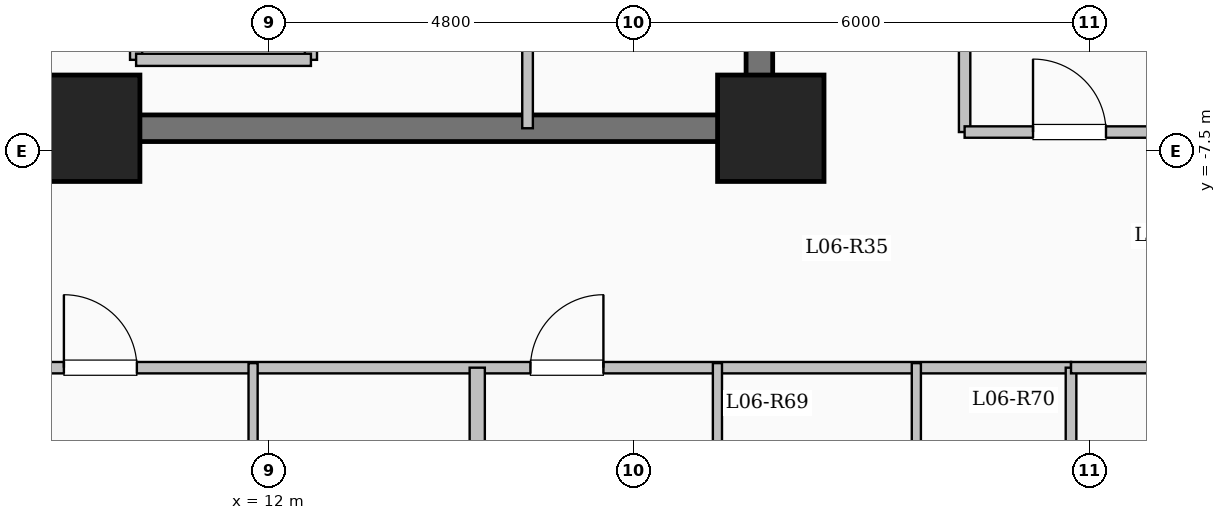
"""IFC4 building model, lengths in metres.
Left out: names, types, materials, properties, quantities, classifications, styles, units other than length and angle.
Written with IfcOpenShell. Run it as: python <this file> out.ifc"""

import sys

from ifc_helpers import new_model, si_unit, direction, frame, frame_2d, origin, origin_2d, place, context, subcontext, project, spatial, rectangle, extrude, element, fill, save


model = new_model("IFC4")
c1 = context("Model", 3, precision=1e-05, world=origin(), true_north=direction((0.0, 1.0)))
c2 = subcontext(c1, "Body", "Model", "MODEL_VIEW")
j1 = project(units=[si_unit("LENGTHUNIT", "METRE"), si_unit("PLANEANGLEUNIT", "RADIAN")], contexts=[c1])
p1 = place(None, origin())
s1 = spatial("IfcSite", under=j1, at=p1, CompositionType="ELEMENT")
p2 = place(p1, origin())
s2 = spatial("IfcBuilding", under=s1, at=p2, CompositionType="ELEMENT")
p3 = place(p2, frame((0.0, 0.0, 27.35)))
s3 = spatial("IfcBuildingStorey", under=s2, at=p3, CompositionType="ELEMENT", Elevation=27.35)
for number, where, z_axis, x_axis in (
    (1, (9.6, -7.2, 0.0), (0.0, 0.0, 1.0), (1.0, 0.0, 0.0)),
    (2, (18.6, -7.2, 0.0), (0.0, 0.0, 1.0), (1.0, 0.0, 0.0)),
):
    element("IfcColumn", number, at=place(p3, frame(where, z_axis=z_axis, x_axis=x_axis)), inside=s3, PredefinedType="COLUMN", context=c2, shape_type="SweptSolid", body=[
        extrude(rectangle(XDim=1.4, YDim=1.4, at=origin_2d()), origin(), (0.0, 0.0, 1.0), 3.35),
    ])
for number, where, z_axis, x_axis in (
    (3, (10.25, -6.3, 0.0), (0.0, 0.0, 1.0), (0.0, 1.0, 0.0)),
    (4, (12.55, -6.3, 0.0), (0.0, 0.0, 1.0), (0.0, 1.0, 0.0)),
):
    element("IfcWall", number, at=place(p3, frame(where, z_axis=z_axis, x_axis=x_axis)), inside=s3, PredefinedType="SOLIDWALL", context=c2, shape_type="SweptSolid", body=[
        extrude(rectangle(XDim=2.6, YDim=0.16, at=frame_2d((1.3, 0.0))), origin(), (0.0, 0.0, 1.0), 3.1),
    ])
p4 = place(p3, frame((10.25, -6.3, 0.0), z_axis=(0.0, 0.0, 1.0), x_axis=(1.0, 0.0, 0.0)))
e5 = element("IfcWall", 5, at=p4, inside=s3, PredefinedType="SOLIDWALL", context=c2, shape_type="SweptSolid", body=[
    extrude(rectangle(XDim=2.3, YDim=0.16, at=frame_2d((1.15, 0.0))), origin(), (0.0, 0.0, 1.0), 3.1),
])
p5 = place(p3, frame((18.45, -7.375, 0.0), z_axis=(0.0, 0.0, 1.0), x_axis=(0.0, 1.0, 0.0)))
e6 = element("IfcWall", 6, at=p5, inside=s3, PredefinedType="SHEAR", context=c2, shape_type="SweptSolid", body=[
    extrude(rectangle(XDim=14.05, YDim=0.35, at=frame_2d((7.025, 0.0))), origin(), (0.0, 0.0, 1.0), 3.35),
])
p6 = place(p3, frame((10.075, -7.2, 0.0), z_axis=(0.0, 0.0, 1.0), x_axis=(1.0, 0.0, 0.0)))
e7 = element("IfcWall", 7, at=p6, inside=s3, PredefinedType="SHEAR", context=c2, shape_type="SweptSolid", body=[
    extrude(rectangle(XDim=8.55, YDim=0.35, at=frame_2d((4.275, 0.0))), origin(), (0.0, 0.0, 1.0), 3.35),
])
p7 = place(p3, frame((15.4, -7.2, 0.0), z_axis=(0.0, 0.0, 1.0), x_axis=(0.0, 1.0, 0.0)))
e8 = element("IfcWall", 8, at=p7, inside=s3, PredefinedType="PARTITIONING", context=c2, shape_type="SweptSolid", body=[
    extrude(rectangle(XDim=10.45, YDim=0.14, at=frame_2d((5.225, 0.0))), origin(), (0.0, 0.0, 1.0), 3.1),
])
p8 = place(p7, frame((9.25, 0.0, 0.0)))
e9 = element("IfcOpeningElement", 9, at=p8, cuts=e8, PredefinedType="OPENING", context=c2, shape_type="SweptSolid", body=[
    extrude(rectangle(XDim=0.9, YDim=2.08, at=frame_2d((0.45, 1.04))), frame((0.0, 0.08, 0.0), z_axis=(0.0, -1.0, 0.0), x_axis=(1.0, 0.0, 0.0)), (0.0, 0.0, 1.0), 0.16),
])
p9 = place(p3, frame((21.15, -7.25, 0.0), z_axis=(0.0, 0.0, 1.0), x_axis=(0.0, 1.0, 0.0)))
e10 = element("IfcWall", 10, at=p9, inside=s3, PredefinedType="PARTITIONING", context=c2, shape_type="SweptSolid", body=[
    extrude(rectangle(XDim=18.0, YDim=0.15, at=frame_2d((9.0, 0.0))), origin(), (0.0, 0.0, 1.0), 2.585),
])
p10 = place(p3, frame((8.55, -10.35, 0.0), z_axis=(0.0, 0.0, 1.0), x_axis=(1.0, 0.0, 0.0)))
e11 = element("IfcWall", 11, at=p10, inside=s3, PredefinedType="PARTITIONING", context=c2, shape_type="SweptSolid", body=[
    extrude(rectangle(XDim=14.0, YDim=0.15, at=frame_2d((7.0, 0.0))), origin(), (0.0, 0.0, 1.0), 3.1),
])
p11 = place(p10, frame((0.75, 0.0, 0.0)))
e12 = element("IfcOpeningElement", 12, at=p11, cuts=e11, PredefinedType="OPENING", context=c2, shape_type="SweptSolid", body=[
    extrude(rectangle(XDim=0.96, YDim=2.15, at=frame_2d((0.48, 1.075))), frame((0.0, 0.085, 0.0), z_axis=(0.0, -1.0, 0.0), x_axis=(1.0, 0.0, 0.0)), (0.0, 0.0, 1.0), 0.17),
])
p12 = place(p10, frame((6.888, 0.0, 0.0)))
e13 = element("IfcOpeningElement", 13, at=p12, cuts=e11, PredefinedType="OPENING", context=c2, shape_type="SweptSolid", body=[
    extrude(rectangle(XDim=0.96, YDim=2.15, at=frame_2d((0.48, 1.075))), frame((0.0, 0.085, 0.0), z_axis=(0.0, -1.0, 0.0), x_axis=(1.0, 0.0, 0.0)), (0.0, 0.0, 1.0), 0.17),
])
p13 = place(p3, frame((14.738, -23.6, 0.0), z_axis=(0.0, 0.0, 1.0), x_axis=(0.0, 1.0, 0.0)))
e14 = element("IfcWall", 14, at=p13, inside=s3, PredefinedType="SOLIDWALL", context=c2, shape_type="SweptSolid", body=[
    extrude(rectangle(XDim=13.25, YDim=0.2, at=frame_2d((6.625, 0.0))), origin(), (0.0, 0.0, 1.0), 2.435),
])
p14 = place(p3, frame((11.789, -13.51, 0.0), z_axis=(0.0, 0.0, 1.0), x_axis=(0.0, 1.0, 0.0)))
e15 = element("IfcWall", 15, at=p14, inside=s3, PredefinedType="PARTITIONING", context=c2, shape_type="SweptSolid", body=[
    extrude(rectangle(XDim=3.22, YDim=0.12, at=frame_2d((1.61, 0.0))), origin(), (0.0, 0.0, 1.0), 3.1),
])
p15 = place(p14, frame((1.14, 0.0, 0.0)))
e16 = element("IfcOpeningElement", 16, at=p15, cuts=e15, PredefinedType="OPENING", context=c2, shape_type="SweptSolid", body=[
    extrude(rectangle(XDim=0.88, YDim=2.1, at=frame_2d((0.44, 1.05))), frame((0.0, 0.07, 0.0), z_axis=(0.0, -1.0, 0.0), x_axis=(1.0, 0.0, 0.0)), (0.0, 0.0, 1.0), 0.14),
])
p16 = place(p3, frame((17.898, -23.6, 0.0), z_axis=(0.0, 0.0, 1.0), x_axis=(0.0, 1.0, 0.0)))
e17 = element("IfcWall", 17, at=p16, inside=s3, PredefinedType="PARTITIONING", context=c2, shape_type="SweptSolid", body=[
    extrude(rectangle(XDim=13.31, YDim=0.12, at=frame_2d((6.655, 0.0))), origin(), (0.0, 0.0, 1.0), 3.1),
])
p17 = place(p16, frame((9.485, 0.0, 0.0)))
e18 = element("IfcOpeningElement", 18, at=p17, cuts=e17, PredefinedType="OPENING", context=c2, shape_type="SweptSolid", body=[
    extrude(rectangle(XDim=1.08, YDim=2.15, at=frame_2d((0.54, 1.075))), frame((0.0, 0.07, 0.0), z_axis=(0.0, -1.0, 0.0), x_axis=(1.0, 0.0, 0.0)), (0.0, 0.0, 1.0), 0.14),
])
p18 = place(p3, frame((20.515, -12.75, 0.0), z_axis=(0.0, 0.0, 1.0), x_axis=(0.0, 1.0, 0.0)))
e19 = element("IfcWall", 19, at=p18, inside=s3, PredefinedType="PARTITIONING", context=c2, shape_type="SweptSolid", body=[
    extrude(rectangle(XDim=2.46, YDim=0.12, at=frame_2d((1.23, 0.0))), origin(), (0.0, 0.0, 1.0), 3.1),
])
p19 = place(p3, frame((21.15, -7.25, 0.0), z_axis=(0.0, 0.0, 1.0), x_axis=(1.0, 0.0, 0.0)))
e20 = element("IfcWall", 20, at=p19, inside=s3, PredefinedType="PARTITIONING", context=c2, shape_type="SweptSolid", body=[
    extrude(rectangle(XDim=7.53, YDim=0.15, at=frame_2d((3.765, 0.0))), origin(), (0.0, 0.0, 1.0), 3.1),
])
p20 = place(p19, frame((0.9, 0.0, 0.0)))
e21 = element("IfcOpeningElement", 21, at=p20, cuts=e20, PredefinedType="OPENING", context=c2, shape_type="SweptSolid", body=[
    extrude(rectangle(XDim=0.96, YDim=2.15, at=frame_2d((0.48, 1.075))), frame((0.0, 0.085, 0.0), z_axis=(0.0, -1.0, 0.0), x_axis=(1.0, 0.0, 0.0)), (0.0, 0.0, 1.0), 0.17),
])
p21 = place(p3, frame((22.55, -19.05, 0.0), z_axis=(0.0, 0.0, 1.0), x_axis=(0.0, 1.0, 0.0)))
e22 = element("IfcWall", 22, at=p21, inside=s3, PredefinedType="PARTITIONING", context=c2, shape_type="SweptSolid", body=[
    extrude(rectangle(XDim=8.7, YDim=0.14, at=frame_2d((4.35, 0.0))), origin(), (0.0, 0.0, 1.0), 3.1),
])
p22 = place(p3, frame((22.55, -10.35, 0.0), z_axis=(0.0, 0.0, 1.0), x_axis=(1.0, 0.0, 0.0)))
e23 = element("IfcWall", 23, at=p22, inside=s3, PredefinedType="PARTITIONING", context=c2, shape_type="SweptSolid", body=[
    extrude(rectangle(XDim=6.13, YDim=0.15, at=frame_2d((3.065, 0.0))), origin(), (0.0, 0.0, 1.0), 3.1),
])
p23 = place(p22, frame((2.59, 0.0, 0.0)))
e24 = element("IfcOpeningElement", 24, at=p23, cuts=e23, PredefinedType="OPENING", context=c2, shape_type="SweptSolid", body=[
    extrude(rectangle(XDim=0.95, YDim=2.15, at=frame_2d((0.475, 1.075))), frame((0.0, 0.085, 0.0), z_axis=(0.0, -1.0, 0.0), x_axis=(1.0, 0.0, 0.0)), (0.0, 0.0, 1.0), 0.17),
])
p24 = place(p11, origin())
e25 = element("IfcDoor", 25, at=p24, inside=s3, OperationType="SINGLE_SWING_LEFT", PredefinedType="DOOR", context=c2, shape_type="SweptSolid", body=[
    extrude(rectangle(XDim=0.96, YDim=2.15, at=frame_2d((0.48, 1.075))), frame((0.0, 0.025, 0.0), z_axis=(0.0, -1.0, 0.0), x_axis=(1.0, 0.0, 0.0)), (0.0, 0.0, 1.0), 0.05),
])
fill(e12, e25)
p25 = place(p12, origin())
e26 = element("IfcDoor", 26, at=p25, inside=s3, OperationType="SINGLE_SWING_RIGHT", PredefinedType="DOOR", context=c2, shape_type="SweptSolid", body=[
    extrude(rectangle(XDim=0.96, YDim=2.15, at=frame_2d((0.48, 1.075))), frame((0.0, 0.025, 0.0), z_axis=(0.0, -1.0, 0.0), x_axis=(1.0, 0.0, 0.0)), (0.0, 0.0, 1.0), 0.05),
])
fill(e13, e26)
p26 = place(p20, origin())
e27 = element("IfcDoor", 27, at=p26, inside=s3, OperationType="SINGLE_SWING_LEFT", PredefinedType="DOOR", context=c2, shape_type="SweptSolid", body=[
    extrude(rectangle(XDim=0.96, YDim=2.15, at=frame_2d((0.48, 1.075))), frame((0.0, 0.025, 0.0), z_axis=(0.0, -1.0, 0.0), x_axis=(1.0, 0.0, 0.0)), (0.0, 0.0, 1.0), 0.05),
])
fill(e21, e27)
save(model, sys.argv[1])
